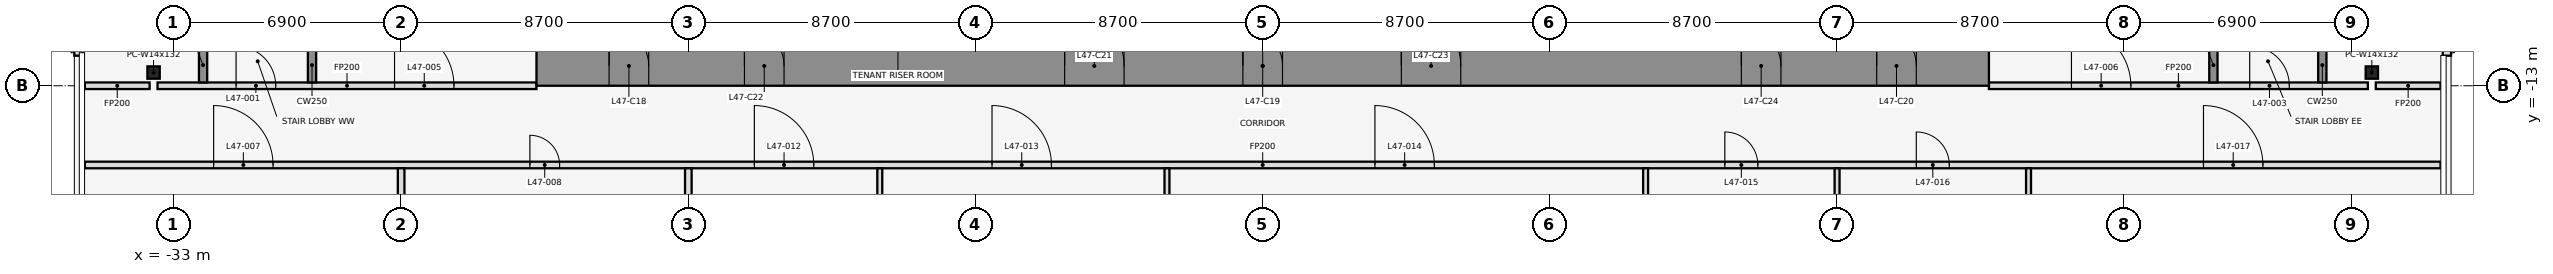
"""IFC4 building model, lengths in metres.
Left out: names, types, materials, properties, quantities, classifications, styles, units other than length and angle.
Written with IfcOpenShell. Run it as: python <this file> out.ifc"""

import sys

from ifc_helpers import new_model, si_unit, direction, frame, frame_2d, origin, origin_2d, place, context, subcontext, project, spatial, rectangle, i_section, extrude, element, fill, save


model = new_model("IFC4")
c1 = context("Model", 3, precision=1e-05, world=origin(), true_north=direction((0.0, 1.0)))
c2 = subcontext(c1, "Body", "Model", "MODEL_VIEW")
j1 = project(units=[si_unit("LENGTHUNIT", "METRE"), si_unit("PLANEANGLEUNIT", "RADIAN")], contexts=[c1])
p1 = place(None, origin())
s1 = spatial("IfcSite", under=j1, at=p1, CompositionType="ELEMENT")
p2 = place(p1, origin())
s2 = spatial("IfcBuilding", under=s1, at=p2, CompositionType="ELEMENT")
p3 = place(p2, frame((0.0, 0.0, 211.4)))
s3 = spatial("IfcBuildingStorey", under=s2, at=p3, CompositionType="ELEMENT", Elevation=211.4)
for number, where, z_axis, x_axis in (
    (1, (-33.6, -12.6, 0.0), (0.0, 0.0, 1.0), (1.0, 0.0, 0.0)),
    (2, (33.6, -12.6, 0.0), (0.0, 0.0, 1.0), (1.0, 0.0, 0.0)),
):
    element("IfcColumn", number, at=place(p3, frame(where, z_axis=z_axis, x_axis=x_axis)), inside=s3, PredefinedType="COLUMN", context=c2, shape_type="SweptSolid", body=[
        extrude(i_section(OverallWidth=0.373, OverallDepth=0.373, WebThickness=0.016, FlangeThickness=0.026, at=origin_2d()), origin(), (0.0, 0.0, 1.0), 4.1),
    ])
for number, where, z_axis, x_axis in (
    (3, (-35.875, -3.0, 0.0), (0.0, 0.0, 1.0), (0.0, -1.0, 0.0)),
    (4, (35.875, -12.09, 0.0), (0.0, 0.0, 1.0), (0.0, 1.0, 0.0)),
):
    element("IfcWall", number, at=place(p3, frame(where, z_axis=z_axis, x_axis=x_axis)), inside=s3, PredefinedType="STANDARD", context=c2, shape_type="SweptSolid", body=[
        extrude(rectangle(XDim=9.09, YDim=0.25, at=frame_2d((4.545, 0.0))), origin(), (0.0, 0.0, 1.0), 3.95),
    ])
p4 = place(p3, frame((-35.68, -15.4, 0.0), z_axis=(0.0, 0.0, 1.0), x_axis=(1.0, 0.0, 0.0)))
e5 = element("IfcWall", 5, at=p4, inside=s3, PredefinedType="PARTITIONING", context=c2, shape_type="SweptSolid", body=[
    extrude(rectangle(XDim=71.36, YDim=0.2, at=frame_2d((35.68, 0.0))), origin(), (0.0, 0.0, 1.0), 2.841),
])
p5 = place(p4, frame((3.9, 0.0, 0.0)))
e6 = element("IfcOpeningElement", 6, at=p5, cuts=e5, PredefinedType="OPENING", context=c2, shape_type="SweptSolid", body=[
    extrude(rectangle(XDim=1.8, YDim=2.1, at=frame_2d((0.9, 1.05))), frame((0.0, 0.112, 0.0), z_axis=(0.0, -1.0, 0.0), x_axis=(1.0, 0.0, 0.0)), (0.0, 0.0, 1.0), 0.224),
])
p6 = place(p4, frame((13.48, 0.0, 0.0)))
e7 = element("IfcOpeningElement", 7, at=p6, cuts=e5, PredefinedType="OPENING", context=c2, shape_type="SweptSolid", body=[
    extrude(rectangle(XDim=0.9, YDim=2.1, at=frame_2d((0.45, 1.05))), frame((0.0, 0.112, 0.0), z_axis=(0.0, -1.0, 0.0), x_axis=(1.0, 0.0, 0.0)), (0.0, 0.0, 1.0), 0.224),
])
p7 = place(p4, frame((20.28, 0.0, 0.0)))
e8 = element("IfcOpeningElement", 8, at=p7, cuts=e5, PredefinedType="OPENING", context=c2, shape_type="SweptSolid", body=[
    extrude(rectangle(XDim=1.8, YDim=2.1, at=frame_2d((0.9, 1.05))), frame((0.0, 0.112, 0.0), z_axis=(0.0, -1.0, 0.0), x_axis=(1.0, 0.0, 0.0)), (0.0, 0.0, 1.0), 0.224),
])
p8 = place(p4, frame((27.48, 0.0, 0.0)))
e9 = element("IfcOpeningElement", 9, at=p8, cuts=e5, PredefinedType="OPENING", context=c2, shape_type="SweptSolid", body=[
    extrude(rectangle(XDim=1.8, YDim=2.1, at=frame_2d((0.9, 1.05))), frame((0.0, 0.112, 0.0), z_axis=(0.0, -1.0, 0.0), x_axis=(1.0, 0.0, 0.0)), (0.0, 0.0, 1.0), 0.224),
])
p9 = place(p4, frame((39.08, 0.0, 0.0)))
e10 = element("IfcOpeningElement", 10, at=p9, cuts=e5, PredefinedType="OPENING", context=c2, shape_type="SweptSolid", body=[
    extrude(rectangle(XDim=1.8, YDim=2.1, at=frame_2d((0.9, 1.05))), frame((0.0, 0.112, 0.0), z_axis=(0.0, -1.0, 0.0), x_axis=(1.0, 0.0, 0.0)), (0.0, 0.0, 1.0), 0.224),
])
p10 = place(p4, frame((49.68, 0.0, 0.0)))
e11 = element("IfcOpeningElement", 11, at=p10, cuts=e5, PredefinedType="OPENING", context=c2, shape_type="SweptSolid", body=[
    extrude(rectangle(XDim=1.0, YDim=2.1, at=frame_2d((0.5, 1.05))), frame((0.0, 0.112, 0.0), z_axis=(0.0, -1.0, 0.0), x_axis=(1.0, 0.0, 0.0)), (0.0, 0.0, 1.0), 0.224),
])
p11 = place(p4, frame((55.48, 0.0, 0.0)))
e12 = element("IfcOpeningElement", 12, at=p11, cuts=e5, PredefinedType="OPENING", context=c2, shape_type="SweptSolid", body=[
    extrude(rectangle(XDim=1.0, YDim=2.1, at=frame_2d((0.5, 1.05))), frame((0.0, 0.112, 0.0), z_axis=(0.0, -1.0, 0.0), x_axis=(1.0, 0.0, 0.0)), (0.0, 0.0, 1.0), 0.224),
])
p12 = place(p4, frame((64.18, 0.0, 0.0)))
e13 = element("IfcOpeningElement", 13, at=p12, cuts=e5, PredefinedType="OPENING", context=c2, shape_type="SweptSolid", body=[
    extrude(rectangle(XDim=1.8, YDim=2.1, at=frame_2d((0.9, 1.05))), frame((0.0, 0.112, 0.0), z_axis=(0.0, -1.0, 0.0), x_axis=(1.0, 0.0, 0.0)), (0.0, 0.0, 1.0), 0.224),
])
p13 = place(p3, frame((-35.68, -13.0, 0.0), z_axis=(0.0, 0.0, 1.0), x_axis=(1.0, 0.0, 0.0)))
e14 = element("IfcWall", 14, at=p13, inside=s3, PredefinedType="PARTITIONING", context=c2, shape_type="SweptSolid", body=[
    extrude(rectangle(XDim=1.96, YDim=0.2, at=frame_2d((0.98, 0.0))), origin(), (0.0, 0.0, 1.0), 2.841),
])
p14 = place(p3, frame((-33.48, -13.0, 0.0), z_axis=(0.0, 0.0, 1.0), x_axis=(1.0, 0.0, 0.0)))
e15 = element("IfcWall", 15, at=p14, inside=s3, PredefinedType="PARTITIONING", context=c2, shape_type="SweptSolid", body=[
    extrude(rectangle(XDim=11.48, YDim=0.2, at=frame_2d((5.74, 0.0))), origin(), (0.0, 0.0, 1.0), 2.841),
])
p15 = place(p14, frame((2.38, 0.0, 0.0)))
e16 = element("IfcOpeningElement", 16, at=p15, cuts=e15, PredefinedType="OPENING", context=c2, shape_type="SweptSolid", body=[
    extrude(rectangle(XDim=1.2, YDim=2.1, at=frame_2d((0.6, 1.05))), frame((0.0, 0.112, 0.0), z_axis=(0.0, -1.0, 0.0), x_axis=(1.0, 0.0, 0.0)), (0.0, 0.0, 1.0), 0.224),
])
p16 = place(p14, frame((7.18, 0.0, 0.0)))
e17 = element("IfcOpeningElement", 17, at=p16, cuts=e15, PredefinedType="OPENING", context=c2, shape_type="SweptSolid", body=[
    extrude(rectangle(XDim=1.8, YDim=2.1, at=frame_2d((0.9, 1.05))), frame((0.0, 0.112, 0.0), z_axis=(0.0, -1.0, 0.0), x_axis=(1.0, 0.0, 0.0)), (0.0, 0.0, 1.0), 0.224),
])
p17 = place(p3, frame((22.0, -13.0, 0.0), z_axis=(0.0, 0.0, 1.0), x_axis=(1.0, 0.0, 0.0)))
e18 = element("IfcWall", 18, at=p17, inside=s3, PredefinedType="PARTITIONING", context=c2, shape_type="SweptSolid", body=[
    extrude(rectangle(XDim=11.48, YDim=0.2, at=frame_2d((5.74, 0.0))), origin(), (0.0, 0.0, 1.0), 2.841),
])
p18 = place(p17, frame((7.9, 0.0, 0.0)))
e19 = element("IfcOpeningElement", 19, at=p18, cuts=e18, PredefinedType="OPENING", context=c2, shape_type="SweptSolid", body=[
    extrude(rectangle(XDim=1.2, YDim=2.1, at=frame_2d((0.6, 1.05))), frame((0.0, 0.112, 0.0), z_axis=(0.0, -1.0, 0.0), x_axis=(1.0, 0.0, 0.0)), (0.0, 0.0, 1.0), 0.224),
])
p19 = place(p17, frame((2.5, 0.0, 0.0)))
e20 = element("IfcOpeningElement", 20, at=p19, cuts=e18, PredefinedType="OPENING", context=c2, shape_type="SweptSolid", body=[
    extrude(rectangle(XDim=1.8, YDim=2.1, at=frame_2d((0.9, 1.05))), frame((0.0, 0.112, 0.0), z_axis=(0.0, -1.0, 0.0), x_axis=(1.0, 0.0, 0.0)), (0.0, 0.0, 1.0), 0.224),
])
p20 = place(p3, frame((33.72, -13.0, 0.0), z_axis=(0.0, 0.0, 1.0), x_axis=(1.0, 0.0, 0.0)))
e21 = element("IfcWall", 21, at=p20, inside=s3, PredefinedType="PARTITIONING", context=c2, shape_type="SweptSolid", body=[
    extrude(rectangle(XDim=1.96, YDim=0.2, at=frame_2d((0.98, 0.0))), origin(), (0.0, 0.0, 1.0), 2.841),
])
for number, where, z_axis, x_axis in (
    (22, (-32.1, -12.9, 0.0), (0.0, 0.0, 1.0), (0.0, 1.0, 0.0)),
    (23, (-28.8, -12.9, 0.0), (0.0, 0.0, 1.0), (0.0, 1.0, 0.0)),
):
    element("IfcWall", number, at=place(p3, frame(where, z_axis=z_axis, x_axis=x_axis)), inside=s3, PredefinedType="SHEAR", context=c2, shape_type="SweptSolid", body=[
        extrude(rectangle(XDim=1.05, YDim=0.25, at=frame_2d((0.525, 0.0))), origin(), (0.0, 0.0, 1.0), 4.1),
    ])
p21 = place(p3, frame((-26.1, -31.79, 0.0), z_axis=(0.0, 0.0, 1.0), x_axis=(0.0, 1.0, 0.0)))
e24 = element("IfcWall", 24, at=p21, inside=s3, PredefinedType="PARTITIONING", context=c2, shape_type="SweptSolid", body=[
    extrude(rectangle(XDim=16.29, YDim=0.2, at=frame_2d((8.145, 0.0))), origin(), (0.0, 0.0, 1.0), 2.841),
])
p22 = place(p3, frame((-17.4, -21.725, 0.0), z_axis=(0.0, 0.0, 1.0), x_axis=(0.0, 1.0, 0.0)))
e25 = element("IfcWall", 25, at=p22, inside=s3, PredefinedType="PARTITIONING", context=c2, shape_type="SweptSolid", body=[
    extrude(rectangle(XDim=6.225, YDim=0.2, at=frame_2d((3.113, 0.0))), origin(), (0.0, 0.0, 1.0), 2.841),
])
p23 = place(p3, frame((-11.6, -31.671, 0.0), z_axis=(0.0, 0.0, 1.0), x_axis=(0.0, 1.0, 0.0)))
e26 = element("IfcWall", 26, at=p23, inside=s3, PredefinedType="PARTITIONING", context=c2, shape_type="SweptSolid", body=[
    extrude(rectangle(XDim=16.171, YDim=0.15, at=frame_2d((8.085, 0.0))), origin(), (0.0, 0.0, 1.0), 2.841),
])
p24 = place(p3, frame((-2.9, -33.46, 0.0), z_axis=(0.0, 0.0, 1.0), x_axis=(0.0, 1.0, 0.0)))
e27 = element("IfcWall", 27, at=p24, inside=s3, PredefinedType="PARTITIONING", context=c2, shape_type="SweptSolid", body=[
    extrude(rectangle(XDim=17.96, YDim=0.15, at=frame_2d((8.98, 0.0))), origin(), (0.0, 0.0, 1.0), 2.841),
])
p25 = place(p3, frame((11.6, -31.671, 0.0), z_axis=(0.0, 0.0, 1.0), x_axis=(0.0, 1.0, 0.0)))
e28 = element("IfcWall", 28, at=p25, inside=s3, PredefinedType="PARTITIONING", context=c2, shape_type="SweptSolid", body=[
    extrude(rectangle(XDim=16.171, YDim=0.15, at=frame_2d((8.085, 0.0))), origin(), (0.0, 0.0, 1.0), 2.841),
])
p26 = place(p3, frame((17.4, -29.359, 0.0), z_axis=(0.0, 0.0, 1.0), x_axis=(0.0, 1.0, 0.0)))
e29 = element("IfcWall", 29, at=p26, inside=s3, PredefinedType="PARTITIONING", context=c2, shape_type="SweptSolid", body=[
    extrude(rectangle(XDim=13.859, YDim=0.15, at=frame_2d((6.929, 0.0))), origin(), (0.0, 0.0, 1.0), 2.841),
])
p27 = place(p3, frame((23.2, -31.79, 0.0), z_axis=(0.0, 0.0, 1.0), x_axis=(0.0, 1.0, 0.0)))
e30 = element("IfcWall", 30, at=p27, inside=s3, PredefinedType="PARTITIONING", context=c2, shape_type="SweptSolid", body=[
    extrude(rectangle(XDim=16.29, YDim=0.15, at=frame_2d((8.145, 0.0))), origin(), (0.0, 0.0, 1.0), 2.841),
])
for number, where, z_axis, x_axis in (
    (31, (28.8, -12.9, 0.0), (0.0, 0.0, 1.0), (0.0, 1.0, 0.0)),
    (32, (32.1, -12.9, 0.0), (0.0, 0.0, 1.0), (0.0, 1.0, 0.0)),
):
    element("IfcWall", number, at=place(p3, frame(where, z_axis=z_axis, x_axis=x_axis)), inside=s3, PredefinedType="SHEAR", context=c2, shape_type="SweptSolid", body=[
        extrude(rectangle(XDim=1.05, YDim=0.25, at=frame_2d((0.525, 0.0))), origin(), (0.0, 0.0, 1.0), 4.1),
    ])
p28 = place(p3, frame((-22.0, -12.4, 0.0), z_axis=(0.0, 0.0, 1.0), x_axis=(1.0, 0.0, 0.0)))
e33 = element("IfcWall", 33, at=p28, inside=s3, PredefinedType="SHEAR", context=c2, shape_type="SweptSolid", body=[
    extrude(rectangle(XDim=44.0, YDim=1.2, at=frame_2d((22.0, 0.0))), origin(), (0.0, 0.0, 1.0), 4.1),
])
p29 = place(p28, frame((2.2, 0.0, 0.0)))
e34 = element("IfcOpeningElement", 34, at=p29, cuts=e33, PredefinedType="OPENING", context=c2, shape_type="SweptSolid", body=[
    extrude(rectangle(XDim=1.2, YDim=2.1, at=frame_2d((0.6, 1.05))), frame((0.0, 0.612, 0.0), z_axis=(0.0, -1.0, 0.0), x_axis=(1.0, 0.0, 0.0)), (0.0, 0.0, 1.0), 1.224),
])
p30 = place(p28, frame((21.4, 0.0, 0.0)))
e35 = element("IfcOpeningElement", 35, at=p30, cuts=e33, PredefinedType="OPENING", context=c2, shape_type="SweptSolid", body=[
    extrude(rectangle(XDim=1.2, YDim=2.1, at=frame_2d((0.6, 1.05))), frame((0.0, 0.612, 0.0), z_axis=(0.0, -1.0, 0.0), x_axis=(1.0, 0.0, 0.0)), (0.0, 0.0, 1.0), 1.224),
])
p31 = place(p28, frame((40.6, 0.0, 0.0)))
e36 = element("IfcOpeningElement", 36, at=p31, cuts=e33, PredefinedType="OPENING", context=c2, shape_type="SweptSolid", body=[
    extrude(rectangle(XDim=1.2, YDim=2.1, at=frame_2d((0.6, 1.05))), frame((0.0, 0.612, 0.0), z_axis=(0.0, -1.0, 0.0), x_axis=(1.0, 0.0, 0.0)), (0.0, 0.0, 1.0), 1.224),
])
p32 = place(p28, frame((16.0, 0.0, 0.0)))
e37 = element("IfcOpeningElement", 37, at=p32, cuts=e33, PredefinedType="OPENING", context=c2, shape_type="SweptSolid", body=[
    extrude(rectangle(XDim=1.8, YDim=2.1, at=frame_2d((0.9, 1.05))), frame((0.0, 0.612, 0.0), z_axis=(0.0, -1.0, 0.0), x_axis=(1.0, 0.0, 0.0)), (0.0, 0.0, 1.0), 1.224),
])
p33 = place(p28, frame((6.3, 0.0, 0.0)))
e38 = element("IfcOpeningElement", 38, at=p33, cuts=e33, PredefinedType="OPENING", context=c2, shape_type="SweptSolid", body=[
    extrude(rectangle(XDim=1.2, YDim=2.1, at=frame_2d((0.6, 1.05))), frame((0.0, 0.612, 0.0), z_axis=(0.0, -1.0, 0.0), x_axis=(1.0, 0.0, 0.0)), (0.0, 0.0, 1.0), 1.224),
])
p34 = place(p28, frame((26.2, 0.0, 0.0)))
e39 = element("IfcOpeningElement", 39, at=p34, cuts=e33, PredefinedType="OPENING", context=c2, shape_type="SweptSolid", body=[
    extrude(rectangle(XDim=1.8, YDim=2.1, at=frame_2d((0.9, 1.05))), frame((0.0, 0.612, 0.0), z_axis=(0.0, -1.0, 0.0), x_axis=(1.0, 0.0, 0.0)), (0.0, 0.0, 1.0), 1.224),
])
p35 = place(p28, frame((36.5, 0.0, 0.0)))
e40 = element("IfcOpeningElement", 40, at=p35, cuts=e33, PredefinedType="OPENING", context=c2, shape_type="SweptSolid", body=[
    extrude(rectangle(XDim=1.2, YDim=2.1, at=frame_2d((0.6, 1.05))), frame((0.0, 0.612, 0.0), z_axis=(0.0, -1.0, 0.0), x_axis=(1.0, 0.0, 0.0)), (0.0, 0.0, 1.0), 1.224),
])
p36 = place(p15, origin())
e41 = element("IfcDoor", 41, at=p36, inside=s3, OperationType="SINGLE_SWING_LEFT", PredefinedType="DOOR", context=c2, shape_type="SweptSolid", body=[
    extrude(rectangle(XDim=1.2, YDim=2.1, at=frame_2d((0.6, 1.05))), frame((0.0, 0.025, 0.0), z_axis=(0.0, -1.0, 0.0), x_axis=(1.0, 0.0, 0.0)), (0.0, 0.0, 1.0), 0.05),
])
fill(e16, e41)
p37 = place(p18, origin())
e42 = element("IfcDoor", 42, at=p37, inside=s3, OperationType="SINGLE_SWING_RIGHT", PredefinedType="DOOR", context=c2, shape_type="SweptSolid", body=[
    extrude(rectangle(XDim=1.2, YDim=2.1, at=frame_2d((0.6, 1.05))), frame((0.0, 0.025, 0.0), z_axis=(0.0, -1.0, 0.0), x_axis=(1.0, 0.0, 0.0)), (0.0, 0.0, 1.0), 0.05),
])
fill(e19, e42)
p38 = place(p16, origin())
e43 = element("IfcDoor", 43, at=p38, inside=s3, OperationType="SINGLE_SWING_LEFT", PredefinedType="DOOR", context=c2, shape_type="SweptSolid", body=[
    extrude(rectangle(XDim=1.8, YDim=2.1, at=frame_2d((0.9, 1.05))), frame((0.0, 0.025, 0.0), z_axis=(0.0, -1.0, 0.0), x_axis=(1.0, 0.0, 0.0)), (0.0, 0.0, 1.0), 0.05),
])
fill(e17, e43)
p39 = place(p19, origin())
e44 = element("IfcDoor", 44, at=p39, inside=s3, OperationType="SINGLE_SWING_LEFT", PredefinedType="DOOR", context=c2, shape_type="SweptSolid", body=[
    extrude(rectangle(XDim=1.8, YDim=2.1, at=frame_2d((0.9, 1.05))), frame((0.0, 0.025, 0.0), z_axis=(0.0, -1.0, 0.0), x_axis=(1.0, 0.0, 0.0)), (0.0, 0.0, 1.0), 0.05),
])
fill(e20, e44)
p40 = place(p5, origin())
e45 = element("IfcDoor", 45, at=p40, inside=s3, OperationType="SINGLE_SWING_LEFT", PredefinedType="DOOR", context=c2, shape_type="SweptSolid", body=[
    extrude(rectangle(XDim=1.8, YDim=2.1, at=frame_2d((0.9, 1.05))), frame((0.0, 0.025, 0.0), z_axis=(0.0, -1.0, 0.0), x_axis=(1.0, 0.0, 0.0)), (0.0, 0.0, 1.0), 0.05),
])
fill(e6, e45)
p41 = place(p6, frame((0.9, 0.0, 0.0), z_axis=(0.0, 0.0, 1.0), x_axis=(-1.0, 0.0, 0.0)))
e46 = element("IfcDoor", 46, at=p41, inside=s3, OperationType="SINGLE_SWING_RIGHT", PredefinedType="DOOR", context=c2, shape_type="SweptSolid", body=[
    extrude(rectangle(XDim=0.9, YDim=2.1, at=frame_2d((0.45, 1.05))), frame((0.0, 0.025, 0.0), z_axis=(0.0, -1.0, 0.0), x_axis=(1.0, 0.0, 0.0)), (0.0, 0.0, 1.0), 0.05),
])
fill(e7, e46)
p42 = place(p7, origin())
e47 = element("IfcDoor", 47, at=p42, inside=s3, OperationType="SINGLE_SWING_LEFT", PredefinedType="DOOR", context=c2, shape_type="SweptSolid", body=[
    extrude(rectangle(XDim=1.8, YDim=2.1, at=frame_2d((0.9, 1.05))), frame((0.0, 0.025, 0.0), z_axis=(0.0, -1.0, 0.0), x_axis=(1.0, 0.0, 0.0)), (0.0, 0.0, 1.0), 0.05),
])
fill(e8, e47)
p43 = place(p8, origin())
e48 = element("IfcDoor", 48, at=p43, inside=s3, OperationType="SINGLE_SWING_LEFT", PredefinedType="DOOR", context=c2, shape_type="SweptSolid", body=[
    extrude(rectangle(XDim=1.8, YDim=2.1, at=frame_2d((0.9, 1.05))), frame((0.0, 0.025, 0.0), z_axis=(0.0, -1.0, 0.0), x_axis=(1.0, 0.0, 0.0)), (0.0, 0.0, 1.0), 0.05),
])
fill(e9, e48)
p44 = place(p9, origin())
e49 = element("IfcDoor", 49, at=p44, inside=s3, OperationType="SINGLE_SWING_LEFT", PredefinedType="DOOR", context=c2, shape_type="SweptSolid", body=[
    extrude(rectangle(XDim=1.8, YDim=2.1, at=frame_2d((0.9, 1.05))), frame((0.0, 0.025, 0.0), z_axis=(0.0, -1.0, 0.0), x_axis=(1.0, 0.0, 0.0)), (0.0, 0.0, 1.0), 0.05),
])
fill(e10, e49)
p45 = place(p10, frame((1.0, 0.0, 0.0), z_axis=(0.0, 0.0, 1.0), x_axis=(-1.0, 0.0, 0.0)))
e50 = element("IfcDoor", 50, at=p45, inside=s3, OperationType="SINGLE_SWING_RIGHT", PredefinedType="DOOR", context=c2, shape_type="SweptSolid", body=[
    extrude(rectangle(XDim=1.0, YDim=2.1, at=frame_2d((0.5, 1.05))), frame((0.0, 0.025, 0.0), z_axis=(0.0, -1.0, 0.0), x_axis=(1.0, 0.0, 0.0)), (0.0, 0.0, 1.0), 0.05),
])
fill(e11, e50)
p46 = place(p11, frame((1.0, 0.0, 0.0), z_axis=(0.0, 0.0, 1.0), x_axis=(-1.0, 0.0, 0.0)))
e51 = element("IfcDoor", 51, at=p46, inside=s3, OperationType="SINGLE_SWING_LEFT", PredefinedType="DOOR", context=c2, shape_type="SweptSolid", body=[
    extrude(rectangle(XDim=1.0, YDim=2.1, at=frame_2d((0.5, 1.05))), frame((0.0, 0.025, 0.0), z_axis=(0.0, -1.0, 0.0), x_axis=(1.0, 0.0, 0.0)), (0.0, 0.0, 1.0), 0.05),
])
fill(e12, e51)
p47 = place(p12, origin())
e52 = element("IfcDoor", 52, at=p47, inside=s3, OperationType="SINGLE_SWING_LEFT", PredefinedType="DOOR", context=c2, shape_type="SweptSolid", body=[
    extrude(rectangle(XDim=1.8, YDim=2.1, at=frame_2d((0.9, 1.05))), frame((0.0, 0.025, 0.0), z_axis=(0.0, -1.0, 0.0), x_axis=(1.0, 0.0, 0.0)), (0.0, 0.0, 1.0), 0.05),
])
fill(e13, e52)
p48 = place(p29, frame((1.2, 0.0, 0.0), z_axis=(0.0, 0.0, 1.0), x_axis=(-1.0, 0.0, 0.0)))
e53 = element("IfcDoor", 53, at=p48, inside=s3, OperationType="SINGLE_SWING_RIGHT", PredefinedType="DOOR", context=c2, shape_type="SweptSolid", body=[
    extrude(rectangle(XDim=1.2, YDim=2.1, at=frame_2d((0.6, 1.05))), frame((0.0, 0.025, 0.0), z_axis=(0.0, -1.0, 0.0), x_axis=(1.0, 0.0, 0.0)), (0.0, 0.0, 1.0), 0.05),
])
fill(e34, e53)
p49 = place(p30, frame((1.2, 0.0, 0.0), z_axis=(0.0, 0.0, 1.0), x_axis=(-1.0, 0.0, 0.0)))
e54 = element("IfcDoor", 54, at=p49, inside=s3, OperationType="SINGLE_SWING_RIGHT", PredefinedType="DOOR", context=c2, shape_type="SweptSolid", body=[
    extrude(rectangle(XDim=1.2, YDim=2.1, at=frame_2d((0.6, 1.05))), frame((0.0, 0.025, 0.0), z_axis=(0.0, -1.0, 0.0), x_axis=(1.0, 0.0, 0.0)), (0.0, 0.0, 1.0), 0.05),
])
fill(e35, e54)
p50 = place(p31, frame((1.2, 0.0, 0.0), z_axis=(0.0, 0.0, 1.0), x_axis=(-1.0, 0.0, 0.0)))
e55 = element("IfcDoor", 55, at=p50, inside=s3, OperationType="SINGLE_SWING_RIGHT", PredefinedType="DOOR", context=c2, shape_type="SweptSolid", body=[
    extrude(rectangle(XDim=1.2, YDim=2.1, at=frame_2d((0.6, 1.05))), frame((0.0, 0.025, 0.0), z_axis=(0.0, -1.0, 0.0), x_axis=(1.0, 0.0, 0.0)), (0.0, 0.0, 1.0), 0.05),
])
fill(e36, e55)
p51 = place(p32, origin())
e56 = element("IfcDoor", 56, at=p51, inside=s3, OperationType="SINGLE_SWING_LEFT", PredefinedType="DOOR", context=c2, shape_type="SweptSolid", body=[
    extrude(rectangle(XDim=1.8, YDim=2.1, at=frame_2d((0.9, 1.05))), frame((0.0, 0.025, 0.0), z_axis=(0.0, -1.0, 0.0), x_axis=(1.0, 0.0, 0.0)), (0.0, 0.0, 1.0), 0.05),
])
fill(e37, e56)
p52 = place(p33, frame((1.2, 0.0, 0.0), z_axis=(0.0, 0.0, 1.0), x_axis=(-1.0, 0.0, 0.0)))
e57 = element("IfcDoor", 57, at=p52, inside=s3, OperationType="SINGLE_SWING_RIGHT", PredefinedType="DOOR", context=c2, shape_type="SweptSolid", body=[
    extrude(rectangle(XDim=1.2, YDim=2.1, at=frame_2d((0.6, 1.05))), frame((0.0, 0.025, 0.0), z_axis=(0.0, -1.0, 0.0), x_axis=(1.0, 0.0, 0.0)), (0.0, 0.0, 1.0), 0.05),
])
fill(e38, e57)
p53 = place(p34, origin())
e58 = element("IfcDoor", 58, at=p53, inside=s3, OperationType="SINGLE_SWING_LEFT", PredefinedType="DOOR", context=c2, shape_type="SweptSolid", body=[
    extrude(rectangle(XDim=1.8, YDim=2.1, at=frame_2d((0.9, 1.05))), frame((0.0, 0.025, 0.0), z_axis=(0.0, -1.0, 0.0), x_axis=(1.0, 0.0, 0.0)), (0.0, 0.0, 1.0), 0.05),
])
fill(e39, e58)
p54 = place(p35, frame((1.2, 0.0, 0.0), z_axis=(0.0, 0.0, 1.0), x_axis=(-1.0, 0.0, 0.0)))
e59 = element("IfcDoor", 59, at=p54, inside=s3, OperationType="SINGLE_SWING_RIGHT", PredefinedType="DOOR", context=c2, shape_type="SweptSolid", body=[
    extrude(rectangle(XDim=1.2, YDim=2.1, at=frame_2d((0.6, 1.05))), frame((0.0, 0.025, 0.0), z_axis=(0.0, -1.0, 0.0), x_axis=(1.0, 0.0, 0.0)), (0.0, 0.0, 1.0), 0.05),
])
fill(e40, e59)
save(model, sys.argv[1])
